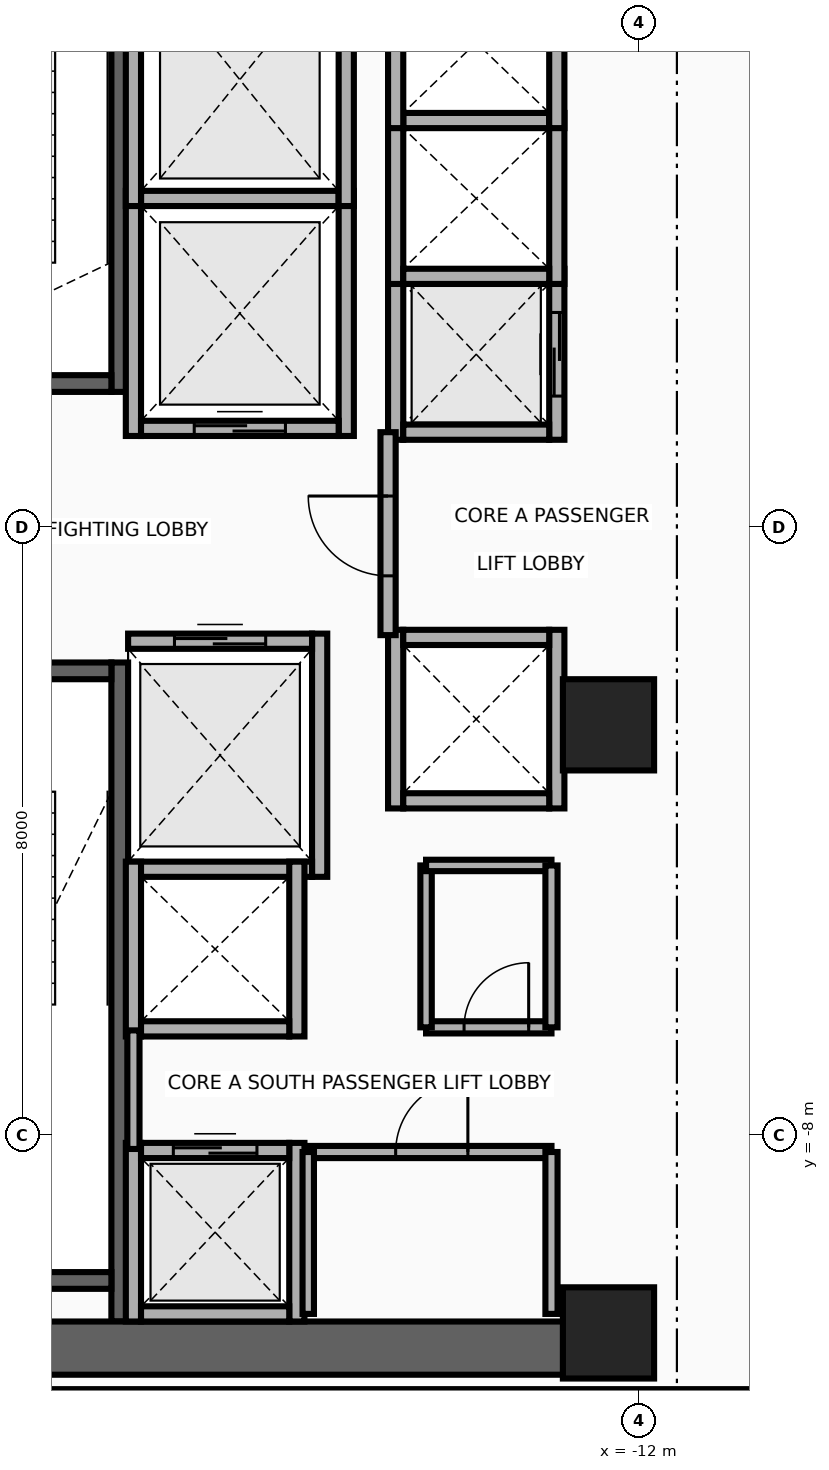
"""IFC4 building model, lengths in metres.
Left out: names, types, materials, properties, quantities, classifications, styles, units other than length and angle.
Written with IfcOpenShell. Run it as: python <this file> out.ifc"""

import sys

from ifc_helpers import new_model, si_unit, direction, frame, frame_2d, origin, origin_2d, place, context, subcontext, project, spatial, rectangle, extrude, source, transform, mapped, element, fill, save


model = new_model("IFC4")
c1 = context("Model", 3, precision=1e-05, world=origin(), true_north=direction((0.0, 1.0)))
c2 = subcontext(c1, "Body", "Model", "MODEL_VIEW")
j1 = project(units=[si_unit("LENGTHUNIT", "METRE"), si_unit("PLANEANGLEUNIT", "RADIAN")], contexts=[c1])
p1 = place(None, origin())
s1 = spatial("IfcSite", under=j1, at=p1, CompositionType="ELEMENT")
p2 = place(p1, origin())
s2 = spatial("IfcBuilding", under=s1, at=p2, CompositionType="ELEMENT")
p3 = place(p2, frame((0.0, 0.0, 120.5)))
s3 = spatial("IfcBuildingStorey", under=s2, at=p3, CompositionType="ELEMENT", Elevation=120.5)
p4 = place(p3, frame((-18.83, 1.78, 0.0), z_axis=(0.0, 0.0, 1.0), x_axis=(0.0, 1.0, 0.0)))
e1 = element("IfcWall", 1, at=p4, inside=s3, PredefinedType="SHEAR", context=c2, shape_type="SweptSolid", body=[
    extrude(rectangle(XDim=8.67, YDim=0.22, at=frame_2d((4.335, 0.0))), origin(), (0.0, 0.0, 1.0), 3.46),
])
p5 = place(p3, frame((-22.05, 1.89, 0.0), z_axis=(0.0, 0.0, 1.0), x_axis=(1.0, 0.0, 0.0)))
e2 = element("IfcWall", 2, at=p5, inside=s3, PredefinedType="SHEAR", context=c2, shape_type="SweptSolid", body=[
    extrude(rectangle(XDim=3.11, YDim=0.22, at=frame_2d((1.555, 0.0))), origin(), (0.0, 0.0, 1.0), 3.46),
])
p6 = place(p5, frame((1.0, 0.0, 0.0)))
e3 = element("IfcOpeningElement", 3, at=p6, cuts=e2, PredefinedType="OPENING", context=c2, shape_type="SweptSolid", body=[
    extrude(rectangle(XDim=1.1, YDim=2.15, at=frame_2d((0.55, 1.075))), frame((0.0, 0.125, 0.0), z_axis=(0.0, -1.0, 0.0), x_axis=(1.0, 0.0, 0.0)), (0.0, 0.0, 1.0), 0.25),
])
p7 = place(p3, frame((-18.83, -10.45, 0.0), z_axis=(0.0, 0.0, 1.0), x_axis=(0.0, 1.0, 0.0)))
e4 = element("IfcWall", 4, at=p7, inside=s3, PredefinedType="SHEAR", context=c2, shape_type="SweptSolid", body=[
    extrude(rectangle(XDim=8.67, YDim=0.22, at=frame_2d((4.335, 0.0))), origin(), (0.0, 0.0, 1.0), 3.46),
])
p8 = place(p3, frame((-22.05, -9.91, 0.0), z_axis=(0.0, 0.0, 1.0), x_axis=(1.0, 0.0, 0.0)))
e5 = element("IfcWall", 5, at=p8, inside=s3, PredefinedType="SHEAR", context=c2, shape_type="SweptSolid", body=[
    extrude(rectangle(XDim=3.11, YDim=0.22, at=frame_2d((1.555, 0.0))), origin(), (0.0, 0.0, 1.0), 3.46),
])
p9 = place(p3, frame((-22.05, -1.89, 0.0), z_axis=(0.0, 0.0, 1.0), x_axis=(1.0, 0.0, 0.0)))
e6 = element("IfcWall", 6, at=p9, inside=s3, PredefinedType="SHEAR", context=c2, shape_type="SweptSolid", body=[
    extrude(rectangle(XDim=3.11, YDim=0.22, at=frame_2d((1.555, 0.0))), origin(), (0.0, 0.0, 1.0), 3.46),
])
p10 = place(p9, frame((1.0, 0.0, 0.0)))
e7 = element("IfcOpeningElement", 7, at=p10, cuts=e6, PredefinedType="OPENING", context=c2, shape_type="SweptSolid", body=[
    extrude(rectangle(XDim=1.1, YDim=2.15, at=frame_2d((0.55, 1.075))), frame((0.0, 0.125, 0.0), z_axis=(0.0, -1.0, 0.0), x_axis=(1.0, 0.0, 0.0)), (0.0, 0.0, 1.0), 0.25),
])
p11 = place(p3, frame((-22.65, -10.8, 0.0), z_axis=(0.0, 0.0, 1.0), x_axis=(1.0, 0.0, 0.0)))
e8 = element("IfcWall", 8, at=p11, inside=s3, PredefinedType="SHEAR", context=c2, shape_type="SweptSolid", body=[
    extrude(rectangle(XDim=10.25, YDim=0.7, at=frame_2d((5.125, 0.0))), origin(), (0.0, 0.0, 1.0), 3.46),
])
m1 = source(origin(), c2, "Body", "SweptSolid", [
    extrude(rectangle(XDim=1.2, YDim=1.2, at=origin_2d()), origin(), (0.0, 0.0, 1.0), 3.7),
])
for number, where, z_axis, x_axis in (
    (9, (-12.4, -10.6, 0.0), (0.0, 0.0, 1.0), (1.0, 0.0, 0.0)),
    (10, (-12.4, -2.6, 0.0), (0.0, 0.0, 1.0), (1.0, 0.0, 0.0)),
):
    element("IfcColumn", number, at=place(p3, frame(where, z_axis=z_axis, x_axis=x_axis)), inside=s3, PredefinedType="COLUMN", context=c2, shape_type="MappedRepresentation", body=[
        mapped(m1, transform((0.0, 0.0, 0.0), x_axis=(1.0, 0.0, 0.0), y_axis=(0.0, 1.0, 0.0), z_axis=(0.0, 0.0, 1.0), scale=1.0)),
    ])
for number, where, z_axis, x_axis in (
    (11, (-18.65, 1.2, 0.0), (0.0, 0.0, 1.0), (0.0, 1.0, 0.0)),
    (12, (-15.85, 1.2, 0.0), (0.0, 0.0, 1.0), (0.0, 1.0, 0.0)),
):
    element("IfcWall", number, at=place(p3, frame(where, z_axis=z_axis, x_axis=x_axis)), inside=s3, PredefinedType="MOVABLE", context=c2, shape_type="SweptSolid", body=[
        extrude(rectangle(XDim=3.225, YDim=0.2, at=frame_2d((1.613, 0.0))), origin(), (0.0, 0.0, 1.0), 3.46),
    ])
p12 = place(p3, frame((-18.55, 1.3, 0.0), z_axis=(0.0, 0.0, 1.0), x_axis=(1.0, 0.0, 0.0)))
e13 = element("IfcWall", 13, at=p12, inside=s3, PredefinedType="MOVABLE", context=c2, shape_type="SweptSolid", body=[
    extrude(rectangle(XDim=2.6, YDim=0.2, at=frame_2d((1.3, 0.0))), origin(), (0.0, 0.0, 1.0), 3.46),
])
p13 = place(p12, frame((0.7, 0.0, 0.0)))
e14 = element("IfcOpeningElement", 14, at=p13, cuts=e13, PredefinedType="OPENING", context=c2, shape_type="SweptSolid", body=[
    extrude(rectangle(XDim=1.2, YDim=2.1, at=frame_2d((0.6, 1.05))), frame((0.0, 0.115, 0.0), z_axis=(0.0, -1.0, 0.0), x_axis=(1.0, 0.0, 0.0)), (0.0, 0.0, 1.0), 0.23),
])
p14 = place(p3, frame((-18.55, 4.325, 0.0), z_axis=(0.0, 0.0, 1.0), x_axis=(1.0, 0.0, 0.0)))
e15 = element("IfcWall", 15, at=p14, inside=s3, PredefinedType="MOVABLE", context=c2, shape_type="SweptSolid", body=[
    extrude(rectangle(XDim=2.6, YDim=0.2, at=frame_2d((1.3, 0.0))), origin(), (0.0, 0.0, 1.0), 3.46),
])
p15 = place(p3, frame((-16.2, -4.6, 0.0), z_axis=(0.0, 0.0, 1.0), x_axis=(0.0, 1.0, 0.0)))
e16 = element("IfcWall", 16, at=p15, inside=s3, PredefinedType="MOVABLE", context=c2, shape_type="SweptSolid", body=[
    extrude(rectangle(XDim=3.2, YDim=0.2, at=frame_2d((1.6, 0.0))), origin(), (0.0, 0.0, 1.0), 3.46),
])
p16 = place(p3, frame((-18.72, -4.5, 0.0), z_axis=(0.0, 0.0, 1.0), x_axis=(1.0, 0.0, 0.0)))
e17 = element("IfcWall", 17, at=p16, inside=s3, PredefinedType="MOVABLE", context=c2, shape_type="SweptSolid", body=[
    extrude(rectangle(XDim=2.42, YDim=0.2, at=frame_2d((1.21, 0.0))), origin(), (0.0, 0.0, 1.0), 3.46),
])
p17 = place(p3, frame((-18.72, -1.5, 0.0), z_axis=(0.0, 0.0, 1.0), x_axis=(1.0, 0.0, 0.0)))
e18 = element("IfcWall", 18, at=p17, inside=s3, PredefinedType="MOVABLE", context=c2, shape_type="SweptSolid", body=[
    extrude(rectangle(XDim=2.42, YDim=0.2, at=frame_2d((1.21, 0.0))), origin(), (0.0, 0.0, 1.0), 3.46),
])
p18 = place(p17, frame((0.61, 0.0, 0.0)))
e19 = element("IfcOpeningElement", 19, at=p18, cuts=e18, PredefinedType="OPENING", context=c2, shape_type="SweptSolid", body=[
    extrude(rectangle(XDim=1.2, YDim=2.1, at=frame_2d((0.6, 1.05))), frame((0.0, 0.115, 0.0), z_axis=(0.0, -1.0, 0.0), x_axis=(1.0, 0.0, 0.0)), (0.0, 0.0, 1.0), 0.23),
])
for number, where, z_axis, x_axis in (
    (20, (-18.65, 4.225, 0.0), (0.0, 0.0, 1.0), (0.0, 1.0, 0.0)),
    (21, (-15.85, 4.225, 0.0), (0.0, 0.0, 1.0), (0.0, 1.0, 0.0)),
):
    element("IfcWall", number, at=place(p3, frame(where, z_axis=z_axis, x_axis=x_axis)), inside=s3, PredefinedType="MOVABLE", context=c2, shape_type="SweptSolid", body=[
        extrude(rectangle(XDim=3.325, YDim=0.2, at=frame_2d((1.663, 0.0))), origin(), (0.0, 0.0, 1.0), 3.46),
    ])
for number, where, z_axis, x_axis in (
    (22, (-18.65, -10.45, 0.0), (0.0, 0.0, 1.0), (0.0, 1.0, 0.0)),
    (23, (-16.5, -10.45, 0.0), (0.0, 0.0, 1.0), (0.0, 1.0, 0.0)),
):
    element("IfcWall", number, at=place(p3, frame(where, z_axis=z_axis, x_axis=x_axis)), inside=s3, PredefinedType="MOVABLE", context=c2, shape_type="SweptSolid", body=[
        extrude(rectangle(XDim=2.35, YDim=0.2, at=frame_2d((1.175, 0.0))), origin(), (0.0, 0.0, 1.0), 2.666),
    ])
p19 = place(p3, frame((-18.55, -10.35, 0.0), z_axis=(0.0, 0.0, 1.0), x_axis=(1.0, 0.0, 0.0)))
e24 = element("IfcWall", 24, at=p19, inside=s3, PredefinedType="MOVABLE", context=c2, shape_type="SweptSolid", body=[
    extrude(rectangle(XDim=1.95, YDim=0.2, at=frame_2d((0.975, 0.0))), origin(), (0.0, 0.0, 1.0), 2.666),
])
p20 = place(p3, frame((-18.55, -8.2, 0.0), z_axis=(0.0, 0.0, 1.0), x_axis=(1.0, 0.0, 0.0)))
e25 = element("IfcWall", 25, at=p20, inside=s3, PredefinedType="MOVABLE", context=c2, shape_type="SweptSolid", body=[
    extrude(rectangle(XDim=1.95, YDim=0.2, at=frame_2d((0.975, 0.0))), origin(), (0.0, 0.0, 1.0), 3.46),
])
p21 = place(p20, frame((0.425, 0.0, 0.0)))
e26 = element("IfcOpeningElement", 26, at=p21, cuts=e25, PredefinedType="OPENING", context=c2, shape_type="SweptSolid", body=[
    extrude(rectangle(XDim=1.1, YDim=2.1, at=frame_2d((0.55, 1.05))), frame((0.0, 0.115, 0.0), z_axis=(0.0, -1.0, 0.0), x_axis=(1.0, 0.0, 0.0)), (0.0, 0.0, 1.0), 0.23),
])
p22 = place(p3, frame((-15.2, 1.15, 0.0), z_axis=(0.0, 0.0, 1.0), x_axis=(0.0, 1.0, 0.0)))
e27 = element("IfcWall", 27, at=p22, inside=s3, PredefinedType="MOVABLE", context=c2, shape_type="SweptSolid", body=[
    extrude(rectangle(XDim=2.25, YDim=0.2, at=frame_2d((1.125, 0.0))), origin(), (0.0, 0.0, 1.0), 3.46),
])
p23 = place(p3, frame((-13.08, 1.15, 0.0), z_axis=(0.0, 0.0, 1.0), x_axis=(0.0, 1.0, 0.0)))
e28 = element("IfcWall", 28, at=p23, inside=s3, PredefinedType="MOVABLE", context=c2, shape_type="SweptSolid", body=[
    extrude(rectangle(XDim=2.25, YDim=0.2, at=frame_2d((1.125, 0.0))), origin(), (0.0, 0.0, 1.0), 3.46),
])
p24 = place(p23, frame((0.575, 0.0, 0.0)))
e29 = element("IfcOpeningElement", 29, at=p24, cuts=e28, PredefinedType="OPENING", context=c2, shape_type="SweptSolid", body=[
    extrude(rectangle(XDim=1.1, YDim=2.1, at=frame_2d((0.55, 1.05))), frame((0.0, 0.115, 0.0), z_axis=(0.0, -1.0, 0.0), x_axis=(1.0, 0.0, 0.0)), (0.0, 0.0, 1.0), 0.23),
])
p25 = place(p3, frame((-15.1, 1.25, 0.0), z_axis=(0.0, 0.0, 1.0), x_axis=(1.0, 0.0, 0.0)))
e30 = element("IfcWall", 30, at=p25, inside=s3, PredefinedType="MOVABLE", context=c2, shape_type="SweptSolid", body=[
    extrude(rectangle(XDim=1.92, YDim=0.2, at=frame_2d((0.96, 0.0))), origin(), (0.0, 0.0, 1.0), 3.46),
])
for number, where, z_axis, x_axis in (
    (31, (-15.2, 3.2, 0.0), (0.0, 0.0, 1.0), (0.0, 1.0, 0.0)),
    (32, (-13.08, 3.2, 0.0), (0.0, 0.0, 1.0), (0.0, 1.0, 0.0)),
):
    element("IfcWall", number, at=place(p3, frame(where, z_axis=z_axis, x_axis=x_axis)), inside=s3, PredefinedType="MOVABLE", context=c2, shape_type="SweptSolid", body=[
        extrude(rectangle(XDim=2.25, YDim=0.2, at=frame_2d((1.125, 0.0))), origin(), (0.0, 0.0, 1.0), 3.46),
    ])
for number, where, z_axis, x_axis in (
    (33, (-15.1, 3.3, 0.0), (0.0, 0.0, 1.0), (1.0, 0.0, 0.0)),
    (34, (-15.1, 5.35, 0.0), (0.0, 0.0, 1.0), (1.0, 0.0, 0.0)),
):
    element("IfcWall", number, at=place(p3, frame(where, z_axis=z_axis, x_axis=x_axis)), inside=s3, PredefinedType="MOVABLE", context=c2, shape_type="SweptSolid", body=[
        extrude(rectangle(XDim=1.92, YDim=0.2, at=frame_2d((0.96, 0.0))), origin(), (0.0, 0.0, 1.0), 3.46),
    ])
for number, where, z_axis, x_axis in (
    (35, (-15.2, 5.25, 0.0), (0.0, 0.0, 1.0), (0.0, 1.0, 0.0)),
    (36, (-13.08, 5.25, 0.0), (0.0, 0.0, 1.0), (0.0, 1.0, 0.0)),
):
    element("IfcWall", number, at=place(p3, frame(where, z_axis=z_axis, x_axis=x_axis)), inside=s3, PredefinedType="MOVABLE", context=c2, shape_type="SweptSolid", body=[
        extrude(rectangle(XDim=2.25, YDim=0.2, at=frame_2d((1.125, 0.0))), origin(), (0.0, 0.0, 1.0), 3.46),
    ])
for number, where, z_axis, x_axis in (
    (37, (-18.65, -6.7, 0.0), (0.0, 0.0, 1.0), (0.0, 1.0, 0.0)),
    (38, (-16.5, -6.7, 0.0), (0.0, 0.0, 1.0), (0.0, 1.0, 0.0)),
):
    element("IfcWall", number, at=place(p3, frame(where, z_axis=z_axis, x_axis=x_axis)), inside=s3, PredefinedType="MOVABLE", context=c2, shape_type="SweptSolid", body=[
        extrude(rectangle(XDim=2.3, YDim=0.2, at=frame_2d((1.15, 0.0))), origin(), (0.0, 0.0, 1.0), 3.46),
    ])
p26 = place(p3, frame((-18.55, -6.6, 0.0), z_axis=(0.0, 0.0, 1.0), x_axis=(1.0, 0.0, 0.0)))
e39 = element("IfcWall", 39, at=p26, inside=s3, PredefinedType="MOVABLE", context=c2, shape_type="SweptSolid", body=[
    extrude(rectangle(XDim=1.95, YDim=0.2, at=frame_2d((0.975, 0.0))), origin(), (0.0, 0.0, 1.0), 3.46),
])
for number, where, z_axis, x_axis in (
    (40, (-15.2, -3.7, 0.0), (0.0, 0.0, 1.0), (0.0, 1.0, 0.0)),
    (41, (-13.08, -3.7, 0.0), (0.0, 0.0, 1.0), (0.0, 1.0, 0.0)),
):
    element("IfcWall", number, at=place(p3, frame(where, z_axis=z_axis, x_axis=x_axis)), inside=s3, PredefinedType="MOVABLE", context=c2, shape_type="SweptSolid", body=[
        extrude(rectangle(XDim=2.35, YDim=0.2, at=frame_2d((1.175, 0.0))), origin(), (0.0, 0.0, 1.0), 3.46),
    ])
for number, where, z_axis, x_axis in (
    (42, (-15.1, -3.6, 0.0), (0.0, 0.0, 1.0), (1.0, 0.0, 0.0)),
    (43, (-15.1, -1.45, 0.0), (0.0, 0.0, 1.0), (1.0, 0.0, 0.0)),
):
    element("IfcWall", number, at=place(p3, frame(where, z_axis=z_axis, x_axis=x_axis)), inside=s3, PredefinedType="MOVABLE", context=c2, shape_type="SweptSolid", body=[
        extrude(rectangle(XDim=1.92, YDim=0.2, at=frame_2d((0.96, 0.0))), origin(), (0.0, 0.0, 1.0), 3.46),
    ])
p27 = place(p3, frame((-15.3, -1.42, 0.0), z_axis=(0.0, 0.0, 1.0), x_axis=(0.0, 1.0, 0.0)))
e44 = element("IfcWall", 44, at=p27, inside=s3, PredefinedType="PARTITIONING", context=c2, shape_type="SweptSolid", body=[
    extrude(rectangle(XDim=2.67, YDim=0.2, at=frame_2d((1.335, 0.0))), origin(), (0.0, 0.0, 1.0), 3.46),
])
p28 = place(p27, frame((0.78, 0.0, 0.0)))
e45 = element("IfcOpeningElement", 45, at=p28, cuts=e44, PredefinedType="OPENING", context=c2, shape_type="SweptSolid", body=[
    extrude(rectangle(XDim=1.05, YDim=2.15, at=frame_2d((0.525, 1.075))), frame((0.0, 0.115, 0.0), z_axis=(0.0, -1.0, 0.0), x_axis=(1.0, 0.0, 0.0)), (0.0, 0.0, 1.0), 0.23),
])
p29 = place(p3, frame((-18.65, -8.18, 0.0), z_axis=(0.0, 0.0, 1.0), x_axis=(0.0, 1.0, 0.0)))
e46 = element("IfcWall", 46, at=p29, inside=s3, PredefinedType="PARTITIONING", context=c2, shape_type="SweptSolid", body=[
    extrude(rectangle(XDim=1.56, YDim=0.16, at=frame_2d((0.78, 0.0))), origin(), (0.0, 0.0, 1.0), 3.46),
])
p30 = place(p3, frame((-16.35, -8.22, 0.0), z_axis=(0.0, 0.0, 1.0), x_axis=(1.0, 0.0, 0.0)))
e47 = element("IfcWall", 47, at=p30, inside=s3, PredefinedType="PARTITIONING", context=c2, shape_type="SweptSolid", body=[
    extrude(rectangle(XDim=3.2, YDim=0.16, at=frame_2d((1.6, 0.0))), origin(), (0.0, 0.0, 1.0), 3.46),
])
p31 = place(p30, frame((1.15, 0.0, 0.0)))
e48 = element("IfcOpeningElement", 48, at=p31, cuts=e47, PredefinedType="OPENING", context=c2, shape_type="SweptSolid", body=[
    extrude(rectangle(XDim=0.95, YDim=2.15, at=frame_2d((0.475, 1.075))), frame((0.0, 0.095, 0.0), z_axis=(0.0, -1.0, 0.0), x_axis=(1.0, 0.0, 0.0)), (0.0, 0.0, 1.0), 0.19),
])
p32 = place(p3, frame((-16.35, -10.35, 0.0), z_axis=(0.0, 0.0, 1.0), x_axis=(0.0, 1.0, 0.0)))
e49 = element("IfcWall", 49, at=p32, inside=s3, PredefinedType="PARTITIONING", context=c2, shape_type="SweptSolid", body=[
    extrude(rectangle(XDim=2.13, YDim=0.15, at=frame_2d((1.065, 0.0))), origin(), (0.0, 0.0, 1.0), 3.46),
])
p33 = place(p3, frame((-13.15, -10.35, 0.0), z_axis=(0.0, 0.0, 1.0), x_axis=(0.0, 1.0, 0.0)))
e50 = element("IfcWall", 50, at=p33, inside=s3, PredefinedType="PARTITIONING", context=c2, shape_type="SweptSolid", body=[
    extrude(rectangle(XDim=2.13, YDim=0.16, at=frame_2d((1.065, 0.0))), origin(), (0.0, 0.0, 1.0), 3.46),
])
p34 = place(p3, frame((-14.8, -6.58, 0.0), z_axis=(0.0, 0.0, 1.0), x_axis=(1.0, 0.0, 0.0)))
e51 = element("IfcWall", 51, at=p34, inside=s3, PredefinedType="PARTITIONING", context=c2, shape_type="SweptSolid", body=[
    extrude(rectangle(XDim=1.65, YDim=0.16, at=frame_2d((0.825, 0.0))), origin(), (0.0, 0.0, 1.0), 3.46),
])
p35 = place(p34, frame((0.5, 0.0, 0.0)))
e52 = element("IfcOpeningElement", 52, at=p35, cuts=e51, PredefinedType="OPENING", context=c2, shape_type="SweptSolid", body=[
    extrude(rectangle(XDim=0.85, YDim=2.05, at=frame_2d((0.425, 1.025))), frame((0.0, 0.095, 0.0), z_axis=(0.0, -1.0, 0.0), x_axis=(1.0, 0.0, 0.0)), (0.0, 0.0, 1.0), 0.19),
])
p36 = place(p3, frame((-14.8, -6.58, 0.0), z_axis=(0.0, 0.0, 1.0), x_axis=(0.0, 1.0, 0.0)))
e53 = element("IfcWall", 53, at=p36, inside=s3, PredefinedType="PARTITIONING", context=c2, shape_type="SweptSolid", body=[
    extrude(rectangle(XDim=2.13, YDim=0.15, at=frame_2d((1.065, 0.0))), origin(), (0.0, 0.0, 1.0), 3.46),
])
p37 = place(p3, frame((-14.8, -4.45, 0.0), z_axis=(0.0, 0.0, 1.0), x_axis=(1.0, 0.0, 0.0)))
e54 = element("IfcWall", 54, at=p37, inside=s3, PredefinedType="PARTITIONING", context=c2, shape_type="SweptSolid", body=[
    extrude(rectangle(XDim=1.65, YDim=0.15, at=frame_2d((0.825, 0.0))), origin(), (0.0, 0.0, 1.0), 3.46),
])
p38 = place(p3, frame((-13.15, -6.58, 0.0), z_axis=(0.0, 0.0, 1.0), x_axis=(0.0, 1.0, 0.0)))
e55 = element("IfcWall", 55, at=p38, inside=s3, PredefinedType="PARTITIONING", context=c2, shape_type="SweptSolid", body=[
    extrude(rectangle(XDim=2.13, YDim=0.16, at=frame_2d((1.065, 0.0))), origin(), (0.0, 0.0, 1.0), 3.46),
])
p39 = place(p3, frame((-23.45, -11.42, 0.0), z_axis=(0.0, 0.0, 1.0), x_axis=(1.0, 0.0, 0.0)))
e56 = element("IfcWall", 56, at=p39, inside=s3, PredefinedType="PARTITIONING", context=c2, shape_type="SweptSolid", body=[
    extrude(rectangle(XDim=13.84, YDim=0.16, at=frame_2d((6.92, 0.0))), origin(), (0.0, 0.0, 1.0), 2.834),
])
p40 = place(p13, origin())
e57 = element("IfcDoor", 57, at=p40, inside=s3, OperationType="DOUBLE_DOOR_SLIDING", PredefinedType="DOOR", context=c2, shape_type="SweptSolid", body=[
    extrude(rectangle(XDim=1.2, YDim=2.1, at=frame_2d((0.6, 1.05))), frame((0.0, 0.025, 0.0), z_axis=(0.0, -1.0, 0.0), x_axis=(1.0, 0.0, 0.0)), (0.0, 0.0, 1.0), 0.05),
])
fill(e14, e57)
p41 = place(p18, origin())
e58 = element("IfcDoor", 58, at=p41, inside=s3, OperationType="DOUBLE_DOOR_SLIDING", PredefinedType="DOOR", context=c2, shape_type="SweptSolid", body=[
    extrude(rectangle(XDim=1.2, YDim=2.1, at=frame_2d((0.6, 1.05))), frame((0.0, 0.025, 0.0), z_axis=(0.0, -1.0, 0.0), x_axis=(1.0, 0.0, 0.0)), (0.0, 0.0, 1.0), 0.05),
])
fill(e19, e58)
p42 = place(p21, origin())
e59 = element("IfcDoor", 59, at=p42, inside=s3, OperationType="DOUBLE_DOOR_SLIDING", PredefinedType="DOOR", context=c2, shape_type="SweptSolid", body=[
    extrude(rectangle(XDim=1.1, YDim=2.1, at=frame_2d((0.55, 1.05))), frame((0.0, 0.025, 0.0), z_axis=(0.0, -1.0, 0.0), x_axis=(1.0, 0.0, 0.0)), (0.0, 0.0, 1.0), 0.05),
])
fill(e26, e59)
p43 = place(p24, origin())
e60 = element("IfcDoor", 60, at=p43, inside=s3, OperationType="DOUBLE_DOOR_SLIDING", PredefinedType="DOOR", context=c2, shape_type="SweptSolid", body=[
    extrude(rectangle(XDim=1.1, YDim=2.1, at=frame_2d((0.55, 1.05))), frame((0.0, 0.025, 0.0), z_axis=(0.0, -1.0, 0.0), x_axis=(1.0, 0.0, 0.0)), (0.0, 0.0, 1.0), 0.05),
])
fill(e29, e60)
p44 = place(p28, origin())
e61 = element("IfcDoor", 61, at=p44, inside=s3, OperationType="SINGLE_SWING_RIGHT", PredefinedType="DOOR", context=c2, shape_type="SweptSolid", body=[
    extrude(rectangle(XDim=1.05, YDim=2.15, at=frame_2d((0.525, 1.075))), frame((0.0, 0.025, 0.0), z_axis=(0.0, -1.0, 0.0), x_axis=(1.0, 0.0, 0.0)), (0.0, 0.0, 1.0), 0.05),
])
fill(e45, e61)
p45 = place(p31, origin())
e62 = element("IfcDoor", 62, at=p45, inside=s3, OperationType="SINGLE_SWING_RIGHT", PredefinedType="DOOR", context=c2, shape_type="SweptSolid", body=[
    extrude(rectangle(XDim=0.95, YDim=2.15, at=frame_2d((0.475, 1.075))), frame((0.0, 0.025, 0.0), z_axis=(0.0, -1.0, 0.0), x_axis=(1.0, 0.0, 0.0)), (0.0, 0.0, 1.0), 0.05),
])
fill(e48, e62)
p46 = place(p35, origin())
e63 = element("IfcDoor", 63, at=p46, inside=s3, OperationType="SINGLE_SWING_LEFT", PredefinedType="DOOR", context=c2, shape_type="SweptSolid", body=[
    extrude(rectangle(XDim=0.85, YDim=2.05, at=frame_2d((0.425, 1.025))), frame((0.0, 0.025, 0.0), z_axis=(0.0, -1.0, 0.0), x_axis=(1.0, 0.0, 0.0)), (0.0, 0.0, 1.0), 0.05),
])
fill(e52, e63)
save(model, sys.argv[1])
